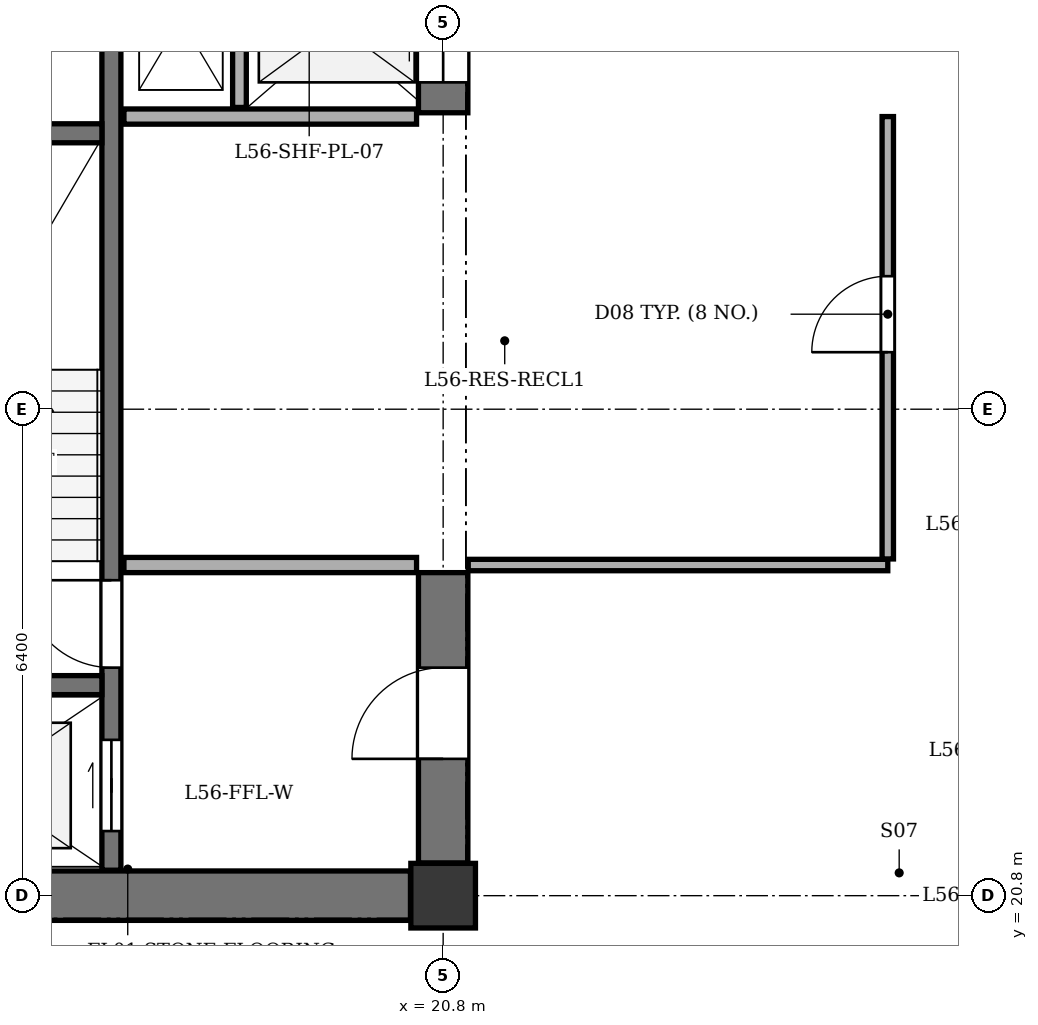
"""IFC4 building model, lengths in metres.
Left out: names, types, materials, properties, quantities, classifications, styles, units other than length and angle.
Written with IfcOpenShell. Run it as: python <this file> out.ifc"""

import sys

from ifc_helpers import new_model, si_unit, direction, frame, frame_2d, origin, origin_2d, place, context, subcontext, project, spatial, rectangle, extrude, element, fill, save


model = new_model("IFC4")
c1 = context("Model", 3, precision=1e-05, world=origin(), true_north=direction((0.0, 1.0)))
c2 = subcontext(c1, "Body", "Model", "MODEL_VIEW")
j1 = project(units=[si_unit("LENGTHUNIT", "METRE"), si_unit("PLANEANGLEUNIT", "RADIAN")], contexts=[c1])
p1 = place(None, origin())
s1 = spatial("IfcSite", under=j1, at=p1, CompositionType="ELEMENT")
p2 = place(p1, origin())
s2 = spatial("IfcBuilding", under=s1, at=p2, CompositionType="ELEMENT")
p3 = place(p2, frame((0.0, 0.0, 217.7)))
s3 = spatial("IfcBuildingStorey", under=s2, at=p3, CompositionType="ELEMENT", Elevation=217.7)
p4 = place(p3, frame((20.8, 20.8, 0.0), z_axis=(0.0, 0.0, 1.0), x_axis=(1.0, 0.0, 0.0)))
e1 = element("IfcColumn", 1, at=p4, inside=s3, PredefinedType="COLUMN", context=c2, shape_type="SweptSolid", body=[
    extrude(rectangle(XDim=0.85, YDim=0.85, at=origin_2d()), origin(), (0.0, 0.0, 1.0), 3.4),
])
p5 = place(p3, frame((13.23, 20.8, 0.0), z_axis=(0.0, 0.0, 1.0), x_axis=(1.0, 0.0, 0.0)))
e2 = element("IfcWall", 2, at=p5, inside=s3, PredefinedType="SHEAR", context=c2, shape_type="SweptSolid", body=[
    extrude(rectangle(XDim=7.14, YDim=0.65, at=frame_2d((3.57, 0.0))), origin(), (0.0, 0.0, 1.0), 3.1),
])
p6 = place(p3, frame((20.8, 21.23, 0.0), z_axis=(0.0, 0.0, 1.0), x_axis=(0.0, 1.0, 0.0)))
e3 = element("IfcWall", 3, at=p6, inside=s3, PredefinedType="SHEAR", context=c2, shape_type="SweptSolid", body=[
    extrude(rectangle(XDim=3.82, YDim=0.65, at=frame_2d((1.91, 0.0))), origin(), (0.0, 0.0, 1.0), 3.1),
])
p7 = place(p6, frame((1.37, 0.0, 0.0)))
e4 = element("IfcOpeningElement", 4, at=p7, cuts=e3, PredefinedType="OPENING", context=c2, shape_type="SweptSolid", body=[
    extrude(rectangle(XDim=1.2, YDim=2.15, at=frame_2d((0.6, 1.075))), frame((0.0, 0.335, 0.0), z_axis=(0.0, -1.0, 0.0), x_axis=(1.0, 0.0, 0.0)), (0.0, 0.0, 1.0), 0.67),
])
p8 = place(p3, frame((20.8, 31.1, 0.0), z_axis=(0.0, 0.0, 1.0), x_axis=(0.0, 1.0, 0.0)))
e5 = element("IfcWall", 5, at=p8, inside=s3, PredefinedType="SHEAR", context=c2, shape_type="SweptSolid", body=[
    extrude(rectangle(XDim=2.07, YDim=0.65, at=frame_2d((1.035, 0.0))), origin(), (0.0, 0.0, 1.0), 3.1),
])
p9 = place(p8, frame((0.4, 0.0, 0.0)))
e6 = element("IfcOpeningElement", 6, at=p9, cuts=e5, PredefinedType="OPENING", context=c2, shape_type="SweptSolid", body=[
    extrude(rectangle(XDim=1.1, YDim=2.1, at=frame_2d((0.55, 1.05))), frame((0.0, 0.335, 0.0), z_axis=(0.0, -1.0, 0.0), x_axis=(1.0, 0.0, 0.0)), (0.0, 0.0, 1.0), 0.67),
])
p10 = place(p3, frame((16.435, 21.135, 0.0), z_axis=(0.0, 0.0, 1.0), x_axis=(0.0, 1.0, 0.0)))
e7 = element("IfcWall", 7, at=p10, inside=s3, PredefinedType="SHEAR", context=c2, shape_type="SweptSolid", body=[
    extrude(rectangle(XDim=12.13, YDim=0.25, at=frame_2d((6.065, 0.0))), origin(), (0.0, 0.0, 1.0), 3.1),
])
p11 = place(p10, frame((0.515, 0.0, 0.0)))
e8 = element("IfcOpeningElement", 8, at=p11, cuts=e7, PredefinedType="OPENING", context=c2, shape_type="SweptSolid", body=[
    extrude(rectangle(XDim=1.2, YDim=2.15, at=frame_2d((0.6, 1.075))), frame((0.0, 0.135, 0.0), z_axis=(0.0, -1.0, 0.0), x_axis=(1.0, 0.0, 0.0)), (0.0, 0.0, 1.0), 0.27),
])
p12 = place(p10, frame((2.665, 0.0, 0.0)))
e9 = element("IfcOpeningElement", 9, at=p12, cuts=e7, PredefinedType="OPENING", context=c2, shape_type="SweptSolid", body=[
    extrude(rectangle(XDim=1.15, YDim=2.15, at=frame_2d((0.575, 1.075))), frame((0.0, 0.135, 0.0), z_axis=(0.0, -1.0, 0.0), x_axis=(1.0, 0.0, 0.0)), (0.0, 0.0, 1.0), 0.27),
])
for number, where, z_axis, x_axis in (
    (10, (13.135, 23.57, 0.0), (0.0, 0.0, 1.0), (1.0, 0.0, 0.0)),
    (11, (13.135, 30.83, 0.0), (0.0, 0.0, 1.0), (1.0, 0.0, 0.0)),
):
    element("IfcWall", number, at=place(p3, frame(where, z_axis=z_axis, x_axis=x_axis)), inside=s3, PredefinedType="SHEAR", context=c2, shape_type="SweptSolid", body=[
        extrude(rectangle(XDim=3.175, YDim=0.25, at=frame_2d((1.587, 0.0))), origin(), (0.0, 0.0, 1.0), 3.1),
    ])
for number, where, z_axis, x_axis in (
    (12, (16.6, 25.15, 0.0), (0.0, 0.0, 1.0), (1.0, 0.0, 0.0)),
    (13, (16.6, 31.05, 0.0), (0.0, 0.0, 1.0), (1.0, 0.0, 0.0)),
):
    element("IfcWall", number, at=place(p3, frame(where, z_axis=z_axis, x_axis=x_axis)), inside=s3, PredefinedType="SOLIDWALL", context=c2, shape_type="SweptSolid", body=[
        extrude(rectangle(XDim=3.85, YDim=0.2, at=frame_2d((1.925, 0.0))), origin(), (0.0, 0.0, 1.0), 3.1),
    ])
p13 = place(p3, frame((18.12, 31.17, 0.0), z_axis=(0.0, 0.0, 1.0), x_axis=(0.0, 1.0, 0.0)))
e14 = element("IfcWall", 14, at=p13, inside=s3, PredefinedType="PARTITIONING", context=c2, shape_type="SweptSolid", body=[
    extrude(rectangle(XDim=2.095, YDim=0.18, at=frame_2d((1.047, 0.0))), origin(), (0.0, 0.0, 1.0), 3.1),
])
p14 = place(p3, frame((21.13, 25.15, 0.0), z_axis=(0.0, 0.0, 1.0), x_axis=(1.0, 0.0, 0.0)))
e15 = element("IfcWall", 15, at=p14, inside=s3, PredefinedType="PARTITIONING", context=c2, shape_type="SweptSolid", body=[
    extrude(rectangle(XDim=5.52, YDim=0.15, at=frame_2d((2.76, 0.0))), origin(), (0.0, 0.0, 1.0), 3.1),
])
p15 = place(p3, frame((26.65, 25.23, 0.0), z_axis=(0.0, 0.0, 1.0), x_axis=(0.0, 1.0, 0.0)))
e16 = element("IfcWall", 16, at=p15, inside=s3, PredefinedType="PARTITIONING", context=c2, shape_type="SweptSolid", body=[
    extrude(rectangle(XDim=5.82, YDim=0.15, at=frame_2d((2.91, 0.0))), origin(), (0.0, 0.0, 1.0), 3.1),
])
p16 = place(p15, frame((2.72, 0.0, 0.0)))
e17 = element("IfcOpeningElement", 17, at=p16, cuts=e16, PredefinedType="OPENING", context=c2, shape_type="SweptSolid", body=[
    extrude(rectangle(XDim=1.0, YDim=2.1, at=frame_2d((0.5, 1.05))), frame((0.0, 0.085, 0.0), z_axis=(0.0, -1.0, 0.0), x_axis=(1.0, 0.0, 0.0)), (0.0, 0.0, 1.0), 0.17),
])
p17 = place(p7, origin())
e18 = element("IfcDoor", 18, at=p17, inside=s3, OperationType="SINGLE_SWING_LEFT", PredefinedType="DOOR", context=c2, shape_type="SweptSolid", body=[
    extrude(rectangle(XDim=1.2, YDim=2.15, at=frame_2d((0.6, 1.075))), frame((0.0, 0.025, 0.0), z_axis=(0.0, -1.0, 0.0), x_axis=(1.0, 0.0, 0.0)), (0.0, 0.0, 1.0), 0.05),
])
fill(e4, e18)
p18 = place(p9, origin())
e19 = element("IfcDoor", 19, at=p18, inside=s3, OperationType="DOUBLE_DOOR_SLIDING", PredefinedType="DOOR", context=c2, shape_type="SweptSolid", body=[
    extrude(rectangle(XDim=1.1, YDim=2.1, at=frame_2d((0.55, 1.05))), frame((0.0, 0.025, 0.0), z_axis=(0.0, -1.0, 0.0), x_axis=(1.0, 0.0, 0.0)), (0.0, 0.0, 1.0), 0.05),
])
fill(e6, e19)
p19 = place(p11, origin())
e20 = element("IfcDoor", 20, at=p19, inside=s3, OperationType="DOUBLE_DOOR_SLIDING", PredefinedType="DOOR", context=c2, shape_type="SweptSolid", body=[
    extrude(rectangle(XDim=1.2, YDim=2.15, at=frame_2d((0.6, 1.075))), frame((0.0, 0.025, 0.0), z_axis=(0.0, -1.0, 0.0), x_axis=(1.0, 0.0, 0.0)), (0.0, 0.0, 1.0), 0.05),
])
fill(e8, e20)
p20 = place(p12, origin())
e21 = element("IfcDoor", 21, at=p20, inside=s3, OperationType="SINGLE_SWING_RIGHT", PredefinedType="DOOR", context=c2, shape_type="SweptSolid", body=[
    extrude(rectangle(XDim=1.15, YDim=2.15, at=frame_2d((0.575, 1.075))), frame((0.0, 0.025, 0.0), z_axis=(0.0, -1.0, 0.0), x_axis=(1.0, 0.0, 0.0)), (0.0, 0.0, 1.0), 0.05),
])
fill(e9, e21)
p21 = place(p16, origin())
e22 = element("IfcDoor", 22, at=p21, inside=s3, OperationType="SINGLE_SWING_LEFT", PredefinedType="DOOR", context=c2, shape_type="SweptSolid", body=[
    extrude(rectangle(XDim=1.0, YDim=2.1, at=frame_2d((0.5, 1.05))), frame((0.0, 0.025, 0.0), z_axis=(0.0, -1.0, 0.0), x_axis=(1.0, 0.0, 0.0)), (0.0, 0.0, 1.0), 0.05),
])
fill(e17, e22)
save(model, sys.argv[1])
